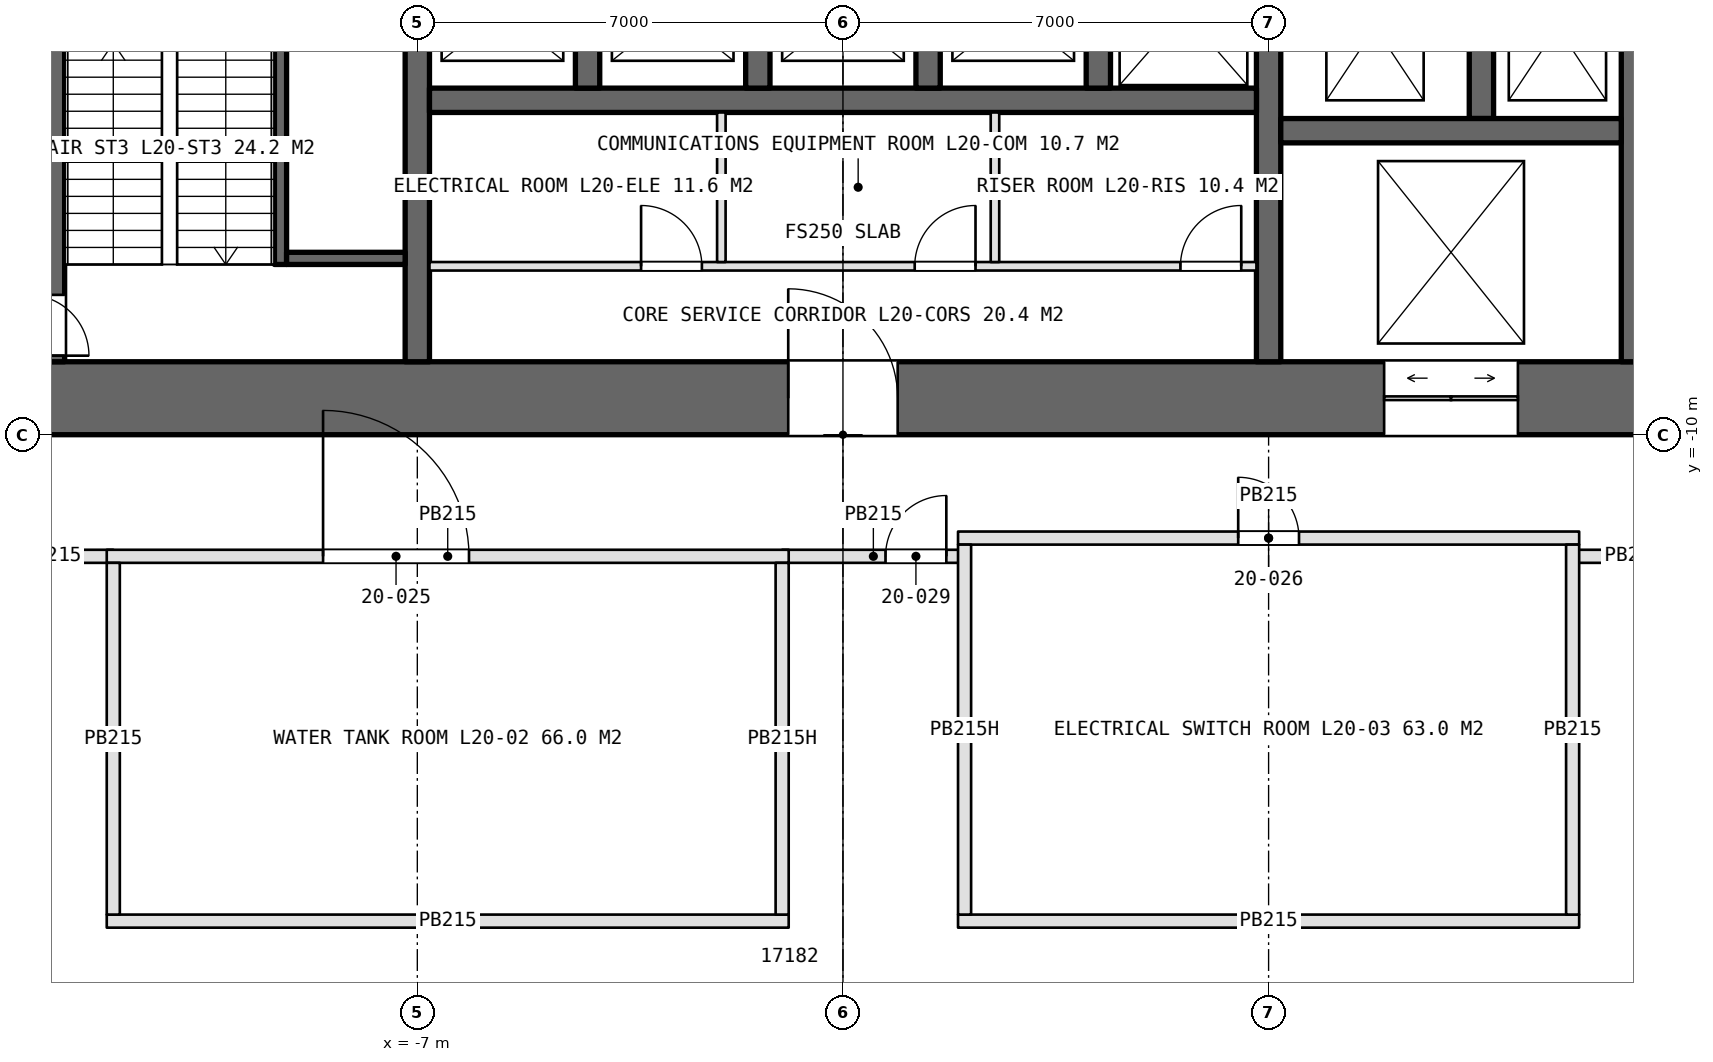
"""IFC4 building model, lengths in metres.
Left out: names, types, materials, properties, quantities, classifications, styles, units other than length and angle.
Written with IfcOpenShell. Run it as: python <this file> out.ifc"""

import sys

from ifc_helpers import new_model, si_unit, direction, frame, frame_2d, origin, place, context, subcontext, project, spatial, rectangle, extrude, element, fill, save


model = new_model("IFC4")
c1 = context("Model", 3, precision=1e-05, world=origin(), true_north=direction((0.0, 1.0)))
c2 = subcontext(c1, "Body", "Model", "MODEL_VIEW")
j1 = project(units=[si_unit("LENGTHUNIT", "METRE"), si_unit("PLANEANGLEUNIT", "RADIAN")], contexts=[c1])
p1 = place(None, origin())
s1 = spatial("IfcSite", under=j1, at=p1, CompositionType="ELEMENT")
p2 = place(p1, origin())
s2 = spatial("IfcBuilding", under=s1, at=p2, CompositionType="ELEMENT")
p3 = place(p2, frame((0.0, 0.0, 100.0)))
s3 = spatial("IfcBuildingStorey", under=s2, at=p3, CompositionType="ELEMENT", Elevation=100.0)
p4 = place(p3, frame((-14.0, -9.4, 0.0), z_axis=(0.0, 0.0, 1.0), x_axis=(1.0, 0.0, 0.0)))
e1 = element("IfcWall", 1, at=p4, inside=s3, PredefinedType="SHEAR", context=c2, shape_type="SweptSolid", body=[
    extrude(rectangle(XDim=28.0, YDim=1.2, at=frame_2d((14.0, 0.0))), origin(), (0.0, 0.0, 1.0), 5.0),
])
p5 = place(p4, frame((13.1, 0.0, 0.0)))
e2 = element("IfcOpeningElement", 2, at=p5, cuts=e1, PredefinedType="OPENING", context=c2, shape_type="SweptSolid", body=[
    extrude(rectangle(XDim=1.8, YDim=2.4, at=frame_2d((0.9, 1.2))), frame((0.0, 0.61, 0.0), z_axis=(0.0, -1.0, 0.0), x_axis=(1.0, 0.0, 0.0)), (0.0, 0.0, 1.0), 1.22),
])
p6 = place(p4, frame((22.9, 0.0, 0.0)))
e3 = element("IfcOpeningElement", 3, at=p6, cuts=e1, PredefinedType="OPENING", context=c2, shape_type="SweptSolid", body=[
    extrude(rectangle(XDim=2.2, YDim=2.7, at=frame_2d((1.1, 1.35))), frame((0.0, 0.61, 0.0), z_axis=(0.0, -1.0, 0.0), x_axis=(1.0, 0.0, 0.0)), (0.0, 0.0, 1.0), 1.22),
])
p7 = place(p3, frame((-13.4, 8.8, 0.0), z_axis=(0.0, 0.0, 1.0), x_axis=(0.0, -1.0, 0.0)))
e4 = element("IfcWall", 4, at=p7, inside=s3, PredefinedType="SHEAR", context=c2, shape_type="SweptSolid", body=[
    extrude(rectangle(XDim=17.6, YDim=1.2, at=frame_2d((8.8, 0.0))), origin(), (0.0, 0.0, 1.0), 5.0),
])
p8 = place(p7, frame((7.9, 0.0, 0.0)))
e5 = element("IfcOpeningElement", 5, at=p8, cuts=e4, PredefinedType="OPENING", context=c2, shape_type="SweptSolid", body=[
    extrude(rectangle(XDim=1.8, YDim=2.4, at=frame_2d((0.9, 1.2))), frame((0.0, 0.61, 0.0), z_axis=(0.0, -1.0, 0.0), x_axis=(1.0, 0.0, 0.0)), (0.0, 0.0, 1.0), 1.22),
])
p9 = place(p7, frame((16.5, 0.0, 0.0)))
e6 = element("IfcOpeningElement", 6, at=p9, cuts=e4, PredefinedType="OPENING", context=c2, shape_type="SweptSolid", body=[
    extrude(rectangle(XDim=1.0, YDim=2.4, at=frame_2d((0.5, 1.2))), frame((0.0, 0.61, 0.0), z_axis=(0.0, -1.0, 0.0), x_axis=(1.0, 0.0, 0.0)), (0.0, 0.0, 1.0), 1.22),
])
p10 = place(p3, frame((13.4, -8.8, 0.0), z_axis=(0.0, 0.0, 1.0), x_axis=(0.0, 1.0, 0.0)))
e7 = element("IfcWall", 7, at=p10, inside=s3, PredefinedType="SHEAR", context=c2, shape_type="SweptSolid", body=[
    extrude(rectangle(XDim=17.6, YDim=1.2, at=frame_2d((8.8, 0.0))), origin(), (0.0, 0.0, 1.0), 5.0),
])
p11 = place(p10, frame((7.9, 0.0, 0.0)))
e8 = element("IfcOpeningElement", 8, at=p11, cuts=e7, PredefinedType="OPENING", context=c2, shape_type="SweptSolid", body=[
    extrude(rectangle(XDim=1.8, YDim=2.4, at=frame_2d((0.9, 1.2))), frame((0.0, 0.61, 0.0), z_axis=(0.0, -1.0, 0.0), x_axis=(1.0, 0.0, 0.0)), (0.0, 0.0, 1.0), 1.22),
])
p12 = place(p3, frame((-7.0, -8.8, 0.0), z_axis=(0.0, 0.0, 1.0), x_axis=(0.0, 1.0, 0.0)))
e9 = element("IfcWall", 9, at=p12, inside=s3, PredefinedType="SHEAR", context=c2, shape_type="SweptSolid", body=[
    extrude(rectangle(XDim=17.6, YDim=0.4, at=frame_2d((8.8, 0.0))), origin(), (0.0, 0.0, 1.0), 5.0),
])
p13 = place(p12, frame((7.9, 0.0, 0.0)))
e10 = element("IfcOpeningElement", 10, at=p13, cuts=e9, PredefinedType="OPENING", context=c2, shape_type="SweptSolid", body=[
    extrude(rectangle(XDim=1.8, YDim=2.4, at=frame_2d((0.9, 1.2))), frame((0.0, 0.21, 0.0), z_axis=(0.0, -1.0, 0.0), x_axis=(1.0, 0.0, 0.0)), (0.0, 0.0, 1.0), 0.42),
])
p14 = place(p3, frame((7.0, -8.8, 0.0), z_axis=(0.0, 0.0, 1.0), x_axis=(0.0, 1.0, 0.0)))
e11 = element("IfcWall", 11, at=p14, inside=s3, PredefinedType="SHEAR", context=c2, shape_type="SweptSolid", body=[
    extrude(rectangle(XDim=17.6, YDim=0.4, at=frame_2d((8.8, 0.0))), origin(), (0.0, 0.0, 1.0), 5.0),
])
p15 = place(p14, frame((7.9, 0.0, 0.0)))
e12 = element("IfcOpeningElement", 12, at=p15, cuts=e11, PredefinedType="OPENING", context=c2, shape_type="SweptSolid", body=[
    extrude(rectangle(XDim=1.8, YDim=2.4, at=frame_2d((0.9, 1.2))), frame((0.0, 0.21, 0.0), z_axis=(0.0, -1.0, 0.0), x_axis=(1.0, 0.0, 0.0)), (0.0, 0.0, 1.0), 0.42),
])
p16 = place(p3, frame((-6.8, -4.5, 0.0), z_axis=(0.0, 0.0, 1.0), x_axis=(1.0, 0.0, 0.0)))
e13 = element("IfcWall", 13, at=p16, inside=s3, PredefinedType="SHEAR", context=c2, shape_type="SweptSolid", body=[
    extrude(rectangle(XDim=13.6, YDim=0.4, at=frame_2d((6.8, 0.0))), origin(), (0.0, 0.0, 1.0), 5.0),
])
p17 = place(p3, frame((10.5, -4.8, 0.0), z_axis=(0.0, 0.0, 1.0), x_axis=(0.0, 1.0, 0.0)))
e14 = element("IfcWall", 14, at=p17, inside=s3, PredefinedType="SHEAR", context=c2, shape_type="SweptSolid", body=[
    extrude(rectangle(XDim=3.0, YDim=0.4, at=frame_2d((1.5, 0.0))), origin(), (0.0, 0.0, 1.0), 5.0),
])
p18 = place(p3, frame((7.2, -5.0, 0.0), z_axis=(0.0, 0.0, 1.0), x_axis=(1.0, 0.0, 0.0)))
e15 = element("IfcWall", 15, at=p18, inside=s3, PredefinedType="SHEAR", context=c2, shape_type="SweptSolid", body=[
    extrude(rectangle(XDim=5.6, YDim=0.4, at=frame_2d((2.8, 0.0))), origin(), (0.0, 0.0, 1.0), 5.0),
])
for number, where, z_axis, x_axis in (
    (16, (-4.2, -4.3, 0.0), (0.0, 0.0, 1.0), (0.0, 1.0, 0.0)),
    (17, (-1.4, -4.3, 0.0), (0.0, 0.0, 1.0), (0.0, 1.0, 0.0)),
    (18, (1.4, -4.3, 0.0), (0.0, 0.0, 1.0), (0.0, 1.0, 0.0)),
    (19, (4.2, -4.3, 0.0), (0.0, 0.0, 1.0), (0.0, 1.0, 0.0)),
):
    element("IfcWall", number, at=place(p3, frame(where, z_axis=z_axis, x_axis=x_axis)), inside=s3, PredefinedType="SHEAR", context=c2, shape_type="SweptSolid", body=[
        extrude(rectangle(XDim=2.5, YDim=0.4, at=frame_2d((1.25, 0.0))), origin(), (0.0, 0.0, 1.0), 5.0),
    ])
p19 = place(p3, frame((-6.8, -7.23, 0.0), z_axis=(0.0, 0.0, 1.0), x_axis=(1.0, 0.0, 0.0)))
e20 = element("IfcWall", 20, at=p19, inside=s3, PredefinedType="PARTITIONING", context=c2, shape_type="SweptSolid", body=[
    extrude(rectangle(XDim=13.6, YDim=0.14, at=frame_2d((6.8, 0.0))), origin(), (0.0, 0.0, 1.0), 4.75),
])
p20 = place(p19, frame((3.48, 0.0, 0.0)))
e21 = element("IfcOpeningElement", 21, at=p20, cuts=e20, PredefinedType="OPENING", context=c2, shape_type="SweptSolid", body=[
    extrude(rectangle(XDim=1.0, YDim=2.4, at=frame_2d((0.5, 1.2))), frame((0.0, 0.08, 0.0), z_axis=(0.0, -1.0, 0.0), x_axis=(1.0, 0.0, 0.0)), (0.0, 0.0, 1.0), 0.16),
])
p21 = place(p19, frame((7.98, 0.0, 0.0)))
e22 = element("IfcOpeningElement", 22, at=p21, cuts=e20, PredefinedType="OPENING", context=c2, shape_type="SweptSolid", body=[
    extrude(rectangle(XDim=1.0, YDim=2.4, at=frame_2d((0.5, 1.2))), frame((0.0, 0.08, 0.0), z_axis=(0.0, -1.0, 0.0), x_axis=(1.0, 0.0, 0.0)), (0.0, 0.0, 1.0), 0.16),
])
p22 = place(p19, frame((12.35, 0.0, 0.0)))
e23 = element("IfcOpeningElement", 23, at=p22, cuts=e20, PredefinedType="OPENING", context=c2, shape_type="SweptSolid", body=[
    extrude(rectangle(XDim=1.0, YDim=2.4, at=frame_2d((0.5, 1.2))), frame((0.0, 0.08, 0.0), z_axis=(0.0, -1.0, 0.0), x_axis=(1.0, 0.0, 0.0)), (0.0, 0.0, 1.0), 0.16),
])
for number, where, z_axis, x_axis in (
    (24, (-2.0, -4.7, 0.0), (0.0, 0.0, 1.0), (0.0, -1.0, 0.0)),
    (25, (2.5, -4.7, 0.0), (0.0, 0.0, 1.0), (0.0, -1.0, 0.0)),
):
    element("IfcWall", number, at=place(p3, frame(where, z_axis=z_axis, x_axis=x_axis)), inside=s3, PredefinedType="PARTITIONING", context=c2, shape_type="SweptSolid", body=[
        extrude(rectangle(XDim=2.46, YDim=0.14, at=frame_2d((1.23, 0.0))), origin(), (0.0, 0.0, 1.0), 4.75),
    ])
p23 = place(p3, frame((-9.25, -7.2, 0.0), z_axis=(0.0, 0.0, 1.0), x_axis=(0.0, 1.0, 0.0)))
e26 = element("IfcWall", 26, at=p23, inside=s3, PredefinedType="SOLIDWALL", context=c2, shape_type="SweptSolid", body=[
    extrude(rectangle(XDim=5.4, YDim=0.2, at=frame_2d((2.7, 0.0))), origin(), (0.0, 0.0, 1.0), 5.0),
])
p24 = place(p3, frame((-9.15, -7.1, 0.0), z_axis=(0.0, 0.0, 1.0), x_axis=(1.0, 0.0, 0.0)))
e27 = element("IfcWall", 27, at=p24, inside=s3, PredefinedType="SOLIDWALL", context=c2, shape_type="SweptSolid", body=[
    extrude(rectangle(XDim=1.95, YDim=0.2, at=frame_2d((0.975, 0.0))), origin(), (0.0, 0.0, 1.0), 5.0),
])
p25 = place(p3, frame((-14.0, -12.0, 0.0), z_axis=(0.0, 0.0, 1.0), x_axis=(1.0, 0.0, 0.0)))
e28 = element("IfcWall", 28, at=p25, inside=s3, PredefinedType="PARTITIONING", context=c2, shape_type="SweptSolid", body=[
    extrude(rectangle(XDim=2.0, YDim=0.215, at=frame_2d((1.0, 0.0))), origin(), (0.0, 0.0, 1.0), 4.2),
])
p26 = place(p3, frame((-1.0, -12.0, 0.0), z_axis=(0.0, 0.0, 1.0), x_axis=(1.0, 0.0, 0.0)))
e29 = element("IfcWall", 29, at=p26, inside=s3, PredefinedType="PARTITIONING", context=c2, shape_type="SweptSolid", body=[
    extrude(rectangle(XDim=3.0, YDim=0.215, at=frame_2d((1.5, 0.0))), origin(), (0.0, 0.0, 1.0), 4.2),
])
p27 = place(p26, frame((1.7, 0.0, 0.0)))
e30 = element("IfcOpeningElement", 30, at=p27, cuts=e29, PredefinedType="OPENING", context=c2, shape_type="SweptSolid", body=[
    extrude(rectangle(XDim=1.0, YDim=2.2, at=frame_2d((0.5, 1.1))), frame((0.0, 0.118, 0.0), z_axis=(0.0, -1.0, 0.0), x_axis=(1.0, 0.0, 0.0)), (0.0, 0.0, 1.0), 0.235),
])
p28 = place(p3, frame((12.0, -12.0, 0.0), z_axis=(0.0, 0.0, 1.0), x_axis=(1.0, 0.0, 0.0)))
e31 = element("IfcWall", 31, at=p28, inside=s3, PredefinedType="PARTITIONING", context=c2, shape_type="SweptSolid", body=[
    extrude(rectangle(XDim=2.0, YDim=0.215, at=frame_2d((1.0, 0.0))), origin(), (0.0, 0.0, 1.0), 4.2),
])
p29 = place(p3, frame((-12.107, -18.0, 0.0), z_axis=(0.0, 0.0, 1.0), x_axis=(1.0, 0.0, 0.0)))
e32 = element("IfcWall", 32, at=p29, inside=s3, PredefinedType="PARTITIONING", context=c2, shape_type="SweptSolid", body=[
    extrude(rectangle(XDim=11.215, YDim=0.215, at=frame_2d((5.607, 0.0))), origin(), (0.0, 0.0, 1.0), 4.2),
])
p30 = place(p3, frame((-12.107, -12.0, 0.0), z_axis=(0.0, 0.0, 1.0), x_axis=(1.0, 0.0, 0.0)))
e33 = element("IfcWall", 33, at=p30, inside=s3, PredefinedType="PARTITIONING", context=c2, shape_type="SweptSolid", body=[
    extrude(rectangle(XDim=11.215, YDim=0.215, at=frame_2d((5.607, 0.0))), origin(), (0.0, 0.0, 1.0), 4.2),
])
p31 = place(p30, frame((3.558, 0.0, 0.0)))
e34 = element("IfcOpeningElement", 34, at=p31, cuts=e33, PredefinedType="OPENING", context=c2, shape_type="SweptSolid", body=[
    extrude(rectangle(XDim=2.4, YDim=2.4, at=frame_2d((1.2, 1.2))), frame((0.0, 0.118, 0.0), z_axis=(0.0, -1.0, 0.0), x_axis=(1.0, 0.0, 0.0)), (0.0, 0.0, 1.0), 0.235),
])
p32 = place(p3, frame((-12.0, -17.893, 0.0), z_axis=(0.0, 0.0, 1.0), x_axis=(0.0, 1.0, 0.0)))
e35 = element("IfcWall", 35, at=p32, inside=s3, PredefinedType="PARTITIONING", context=c2, shape_type="SweptSolid", body=[
    extrude(rectangle(XDim=5.785, YDim=0.215, at=frame_2d((2.893, 0.0))), origin(), (0.0, 0.0, 1.0), 4.2),
])
p33 = place(p3, frame((-1.0, -17.893, 0.0), z_axis=(0.0, 0.0, 1.0), x_axis=(0.0, 1.0, 0.0)))
e36 = element("IfcWall", 36, at=p33, inside=s3, PredefinedType="PARTITIONING", context=c2, shape_type="SweptSolid", body=[
    extrude(rectangle(XDim=5.785, YDim=0.215, at=frame_2d((2.893, 0.0))), origin(), (0.0, 0.0, 1.0), 4.146),
])
p34 = place(p3, frame((1.893, -18.0, 0.0), z_axis=(0.0, 0.0, 1.0), x_axis=(1.0, 0.0, 0.0)))
e37 = element("IfcWall", 37, at=p34, inside=s3, PredefinedType="PARTITIONING", context=c2, shape_type="SweptSolid", body=[
    extrude(rectangle(XDim=10.215, YDim=0.215, at=frame_2d((5.107, 0.0))), origin(), (0.0, 0.0, 1.0), 4.2),
])
p35 = place(p3, frame((1.893, -11.7, 0.0), z_axis=(0.0, 0.0, 1.0), x_axis=(1.0, 0.0, 0.0)))
e38 = element("IfcWall", 38, at=p35, inside=s3, PredefinedType="PARTITIONING", context=c2, shape_type="SweptSolid", body=[
    extrude(rectangle(XDim=10.215, YDim=0.215, at=frame_2d((5.107, 0.0))), origin(), (0.0, 0.0, 1.0), 4.2),
])
p36 = place(p35, frame((4.607, 0.0, 0.0)))
e39 = element("IfcOpeningElement", 39, at=p36, cuts=e38, PredefinedType="OPENING", context=c2, shape_type="SweptSolid", body=[
    extrude(rectangle(XDim=1.0, YDim=2.2, at=frame_2d((0.5, 1.1))), frame((0.0, 0.118, 0.0), z_axis=(0.0, -1.0, 0.0), x_axis=(1.0, 0.0, 0.0)), (0.0, 0.0, 1.0), 0.235),
])
p37 = place(p3, frame((2.0, -17.893, 0.0), z_axis=(0.0, 0.0, 1.0), x_axis=(0.0, 1.0, 0.0)))
e40 = element("IfcWall", 40, at=p37, inside=s3, PredefinedType="PARTITIONING", context=c2, shape_type="SweptSolid", body=[
    extrude(rectangle(XDim=6.085, YDim=0.215, at=frame_2d((3.042, 0.0))), origin(), (0.0, 0.0, 1.0), 4.146),
])
p38 = place(p3, frame((12.0, -17.893, 0.0), z_axis=(0.0, 0.0, 1.0), x_axis=(0.0, 1.0, 0.0)))
e41 = element("IfcWall", 41, at=p38, inside=s3, PredefinedType="PARTITIONING", context=c2, shape_type="SweptSolid", body=[
    extrude(rectangle(XDim=6.085, YDim=0.215, at=frame_2d((3.042, 0.0))), origin(), (0.0, 0.0, 1.0), 4.2),
])
p39 = place(p20, origin())
e42 = element("IfcDoor", 42, at=p39, inside=s3, OperationType="SINGLE_SWING_LEFT", PredefinedType="DOOR", context=c2, shape_type="SweptSolid", body=[
    extrude(rectangle(XDim=1.0, YDim=2.4, at=frame_2d((0.5, 1.2))), frame((0.0, 0.025, 0.0), z_axis=(0.0, -1.0, 0.0), x_axis=(1.0, 0.0, 0.0)), (0.0, 0.0, 1.0), 0.05),
])
fill(e21, e42)
p40 = place(p21, origin())
e43 = element("IfcDoor", 43, at=p40, inside=s3, OperationType="SINGLE_SWING_RIGHT", PredefinedType="DOOR", context=c2, shape_type="SweptSolid", body=[
    extrude(rectangle(XDim=1.0, YDim=2.4, at=frame_2d((0.5, 1.2))), frame((0.0, 0.025, 0.0), z_axis=(0.0, -1.0, 0.0), x_axis=(1.0, 0.0, 0.0)), (0.0, 0.0, 1.0), 0.05),
])
fill(e22, e43)
p41 = place(p22, origin())
e44 = element("IfcDoor", 44, at=p41, inside=s3, OperationType="SINGLE_SWING_RIGHT", PredefinedType="DOOR", context=c2, shape_type="SweptSolid", body=[
    extrude(rectangle(XDim=1.0, YDim=2.4, at=frame_2d((0.5, 1.2))), frame((0.0, 0.025, 0.0), z_axis=(0.0, -1.0, 0.0), x_axis=(1.0, 0.0, 0.0)), (0.0, 0.0, 1.0), 0.05),
])
fill(e23, e44)
p42 = place(p5, origin())
e45 = element("IfcDoor", 45, at=p42, inside=s3, OperationType="DOUBLE_DOOR_SINGLE_SWING", PredefinedType="DOOR", context=c2, shape_type="SweptSolid", body=[
    extrude(rectangle(XDim=1.8, YDim=2.4, at=frame_2d((0.9, 1.2))), frame((0.0, 0.025, 0.0), z_axis=(0.0, -1.0, 0.0), x_axis=(1.0, 0.0, 0.0)), (0.0, 0.0, 1.0), 0.05),
])
fill(e2, e45)
p43 = place(p6, origin())
e46 = element("IfcDoor", 46, at=p43, inside=s3, OperationType="DOUBLE_DOOR_SLIDING", PredefinedType="DOOR", context=c2, shape_type="SweptSolid", body=[
    extrude(rectangle(XDim=2.2, YDim=2.7, at=frame_2d((1.1, 1.35))), frame((0.0, 0.025, 0.0), z_axis=(0.0, -1.0, 0.0), x_axis=(1.0, 0.0, 0.0)), (0.0, 0.0, 1.0), 0.05),
])
fill(e3, e46)
p44 = place(p31, origin())
e47 = element("IfcDoor", 47, at=p44, inside=s3, OperationType="DOUBLE_DOOR_SINGLE_SWING", PredefinedType="DOOR", context=c2, shape_type="SweptSolid", body=[
    extrude(rectangle(XDim=2.4, YDim=2.4, at=frame_2d((1.2, 1.2))), frame((0.0, 0.025, 0.0), z_axis=(0.0, -1.0, 0.0), x_axis=(1.0, 0.0, 0.0)), (0.0, 0.0, 1.0), 0.05),
])
fill(e34, e47)
p45 = place(p36, origin())
e48 = element("IfcDoor", 48, at=p45, inside=s3, OperationType="SINGLE_SWING_LEFT", PredefinedType="DOOR", context=c2, shape_type="SweptSolid", body=[
    extrude(rectangle(XDim=1.0, YDim=2.2, at=frame_2d((0.5, 1.1))), frame((0.0, 0.025, 0.0), z_axis=(0.0, -1.0, 0.0), x_axis=(1.0, 0.0, 0.0)), (0.0, 0.0, 1.0), 0.05),
])
fill(e39, e48)
p46 = place(p27, origin())
e49 = element("IfcDoor", 49, at=p46, inside=s3, OperationType="SINGLE_SWING_RIGHT", PredefinedType="DOOR", context=c2, shape_type="SweptSolid", body=[
    extrude(rectangle(XDim=1.0, YDim=2.2, at=frame_2d((0.5, 1.1))), frame((0.0, 0.025, 0.0), z_axis=(0.0, -1.0, 0.0), x_axis=(1.0, 0.0, 0.0)), (0.0, 0.0, 1.0), 0.05),
])
fill(e30, e49)
save(model, sys.argv[1])
